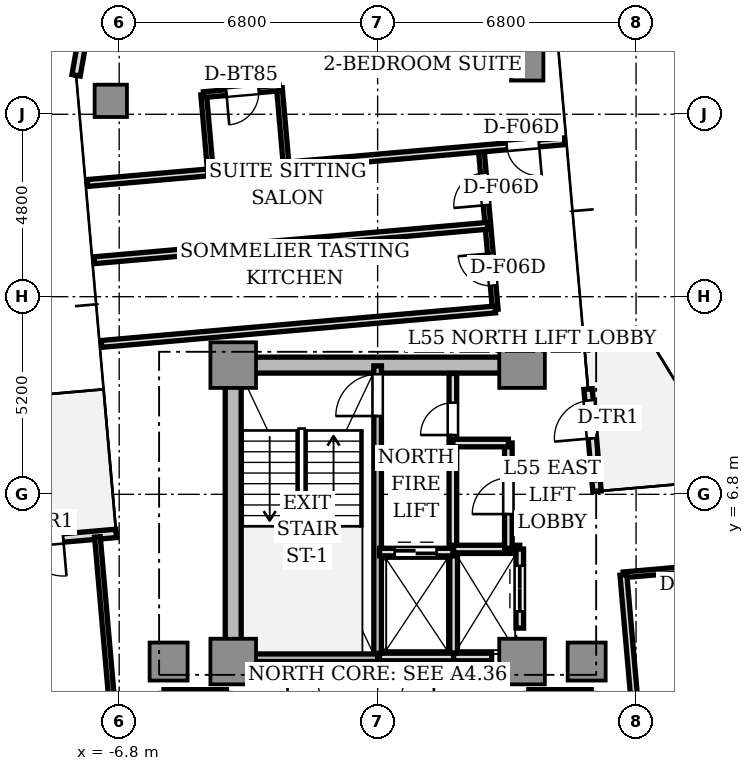
"""IFC4 building model, lengths in metres.
Left out: names, types, materials, properties, quantities, classifications, styles, units other than length and angle.
Written with IfcOpenShell. Run it as: python <this file> out.ifc"""

import sys

from ifc_helpers import new_model, si_unit, direction, frame, frame_2d, origin, origin_2d, place, context, subcontext, project, spatial, rectangle, extrude, source, transform, mapped, element, fill, save


model = new_model("IFC4")
c1 = context("Model", 3, precision=1e-05, world=origin(), true_north=direction((0.0, 1.0)))
c2 = subcontext(c1, "Body", "Model", "MODEL_VIEW")
j1 = project(units=[si_unit("LENGTHUNIT", "METRE"), si_unit("PLANEANGLEUNIT", "RADIAN")], contexts=[c1])
p1 = place(None, origin())
s1 = spatial("IfcSite", under=j1, at=p1, CompositionType="ELEMENT")
p2 = place(p1, origin())
s2 = spatial("IfcBuilding", under=s1, at=p2, CompositionType="ELEMENT")
p3 = place(p2, frame((0.0, 0.0, 198.65)))
s3 = spatial("IfcBuildingStorey", under=s2, at=p3, CompositionType="ELEMENT", Elevation=198.65)
p4 = place(p3, frame((-3.55, 10.2, 0.0), z_axis=(0.0, 0.0, 1.0), x_axis=(1.0, 0.0, 0.0)))
e1 = element("IfcWall", 1, at=p4, inside=s3, PredefinedType="SHEAR", context=c2, shape_type="SweptSolid", body=[
    extrude(rectangle(XDim=7.1, YDim=0.42, at=frame_2d((3.55, 0.0))), origin(), (0.0, 0.0, 1.0), 3.03),
])
p5 = place(p3, frame((-3.8, 2.85, 0.0), z_axis=(0.0, 0.0, 1.0), x_axis=(0.0, 1.0, 0.0)))
e2 = element("IfcWall", 2, at=p5, inside=s3, PredefinedType="SHEAR", context=c2, shape_type="SweptSolid", body=[
    extrude(rectangle(XDim=6.9, YDim=0.42, at=frame_2d((3.45, 0.0))), origin(), (0.0, 0.0, 1.0), 3.03),
])
m1 = source(origin(), c2, "Body", "SweptSolid", [
    extrude(rectangle(XDim=1.2, YDim=1.2, at=origin_2d()), origin(), (0.0, 0.0, 1.0), 3.03),
])
for number, where, z_axis, x_axis in (
    (3, (-3.8, 2.4, 0.0), (0.0, 0.0, 1.0), (1.0, 0.0, 0.0)),
    (4, (3.8, 2.4, 0.0), (0.0, 0.0, 1.0), (1.0, 0.0, 0.0)),
    (5, (-3.8, 10.2, 0.0), (0.0, 0.0, 1.0), (1.0, 0.0, 0.0)),
    (6, (3.8, 10.2, 0.0), (0.0, 0.0, 1.0), (1.0, 0.0, 0.0)),
):
    element("IfcColumn", number, at=place(p3, frame(where, z_axis=z_axis, x_axis=x_axis)), inside=s3, PredefinedType="COLUMN", context=c2, shape_type="MappedRepresentation", body=[
        mapped(m1, transform((0.0, 0.0, 0.0), scale=1.0)),
    ])
m2 = source(origin(), c2, "Body", "SweptSolid", [
    extrude(rectangle(XDim=1.0, YDim=1.0, at=origin_2d()), origin(), (0.0, 0.0, 1.0), 3.03),
])
for number, where, z_axis, x_axis in (
    (7, (5.5, 2.4, 0.0), (0.0, 0.0, 1.0), (1.0, 0.0, 0.0)),
    (8, (-5.5, 2.4, 0.0), (0.0, 0.0, 1.0), (1.0, 0.0, 0.0)),
):
    element("IfcColumn", number, at=place(p3, frame(where, z_axis=z_axis, x_axis=x_axis)), inside=s3, PredefinedType="COLUMN", context=c2, shape_type="MappedRepresentation", body=[
        mapped(m2, transform((0.0, 0.0, 0.0), scale=1.0)),
    ])
m3 = source(origin(), c2, "Body", "SweptSolid", [
    extrude(rectangle(XDim=0.85, YDim=0.85, at=origin_2d()), origin(), (0.0, 0.0, 1.0), 3.03),
])
for number, where, z_axis, x_axis in (
    (9, (3.936, 18.112, 0.0), (0.0, 0.0, 1.0), (1.0, 0.0, 0.0)),
    (10, (-7.022, 17.153, 0.0), (0.0, 0.0, 1.0), (1.0, 0.0, 0.0)),
):
    element("IfcColumn", number, at=place(p3, frame(where, z_axis=z_axis, x_axis=x_axis)), inside=s3, PredefinedType="COLUMN", context=c2, shape_type="MappedRepresentation", body=[
        mapped(m3, transform((0.0, 0.0, 0.0), scale=1.0)),
    ])
p6 = place(p3, frame((5.772, 6.879, 0.0), z_axis=(0.0, 0.0, 1.0), x_axis=(-0.087168071984, 0.996193619346, 0.0)))
e11 = element("IfcWall", 11, at=p6, inside=s3, PredefinedType="STANDARD", context=c2, shape_type="SweptSolid", body=[
    extrude(rectangle(XDim=2.7, YDim=0.22, at=frame_2d((1.35, 0.0))), origin(), (0.0, 0.0, 1.0), 3.03),
])
p7 = place(p6, frame((1.4, 0.0, 0.0)))
e12 = element("IfcOpeningElement", 12, at=p7, cuts=e11, PredefinedType="OPENING", context=c2, shape_type="SweptSolid", body=[
    extrude(rectangle(XDim=1.0, YDim=2.2, at=frame_2d((0.5, 1.1))), frame((0.0, 0.12, 0.0), z_axis=(0.0, -1.0, 0.0), x_axis=(1.0, 0.0, 0.0)), (0.0, 0.0, 1.0), 0.24),
])
p8 = place(p3, frame((-7.768, 18.769, 0.0), z_axis=(0.0, 0.0, 1.0), x_axis=(-0.173654409999, -0.984806654064, 0.0)))
e13 = element("IfcWall", 13, at=p8, inside=s3, PredefinedType="STANDARD", context=c2, shape_type="SweptSolid", body=[
    extrude(rectangle(XDim=0.958, YDim=0.22, at=frame_2d((0.479, 0.0))), origin(), (0.0, 0.0, 1.0), 3.03),
])
p9 = place(p3, frame((-6.879, 5.772, 0.0), z_axis=(0.0, 0.0, 1.0), x_axis=(-0.996193619346, -0.087168071984, 0.0)))
e14 = element("IfcWall", 14, at=p9, inside=s3, PredefinedType="STANDARD", context=c2, shape_type="SweptSolid", body=[
    extrude(rectangle(XDim=2.7, YDim=0.22, at=frame_2d((1.35, 0.0))), origin(), (0.0, 0.0, 1.0), 3.03),
])
p10 = place(p9, frame((1.4, 0.0, 0.0)))
e15 = element("IfcOpeningElement", 15, at=p10, cuts=e14, PredefinedType="OPENING", context=c2, shape_type="SweptSolid", body=[
    extrude(rectangle(XDim=1.0, YDim=2.2, at=frame_2d((0.5, 1.1))), frame((0.0, 0.12, 0.0), z_axis=(0.0, -1.0, 0.0), x_axis=(1.0, 0.0, 0.0)), (0.0, 0.0, 1.0), 0.24),
])
p11 = place(p3, frame((0.0, 2.5, 0.0), z_axis=(0.0, 0.0, 1.0), x_axis=(0.0, 1.0, 0.0)))
e16 = element("IfcWall", 16, at=p11, inside=s3, PredefinedType="SOLIDWALL", context=c2, shape_type="SweptSolid", body=[
    extrude(rectangle(XDim=7.68, YDim=0.2, at=frame_2d((3.84, 0.0))), origin(), (0.0, 0.0, 1.0), 3.03),
])
p12 = place(p11, frame((6.36, 0.0, 0.0)))
e17 = element("IfcOpeningElement", 17, at=p12, cuts=e16, PredefinedType="OPENING", context=c2, shape_type="SweptSolid", body=[
    extrude(rectangle(XDim=1.1, YDim=2.15, at=frame_2d((0.55, 1.075))), frame((0.0, 0.11, 0.0), z_axis=(0.0, -1.0, 0.0), x_axis=(1.0, 0.0, 0.0)), (0.0, 0.0, 1.0), 0.22),
])
p13 = place(p3, frame((-3.72, 2.5, 0.0), z_axis=(0.0, 0.0, 1.0), x_axis=(1.0, 0.0, 0.0)))
e18 = element("IfcWall", 18, at=p13, inside=s3, PredefinedType="SOLIDWALL", context=c2, shape_type="SweptSolid", body=[
    extrude(rectangle(XDim=3.72, YDim=0.2, at=frame_2d((1.86, 0.0))), origin(), (0.0, 0.0, 1.0), 3.03),
])
p14 = place(p3, frame((1.98, 5.32, 0.0), z_axis=(0.0, 0.0, 1.0), x_axis=(0.0, 1.0, 0.0)))
e19 = element("IfcWall", 19, at=p14, inside=s3, PredefinedType="SOLIDWALL", context=c2, shape_type="SweptSolid", body=[
    extrude(rectangle(XDim=4.66, YDim=0.2, at=frame_2d((2.33, 0.0))), origin(), (0.0, 0.0, 1.0), 2.58),
])
p15 = place(p14, frame((3.04, 0.0, 0.0)))
e20 = element("IfcOpeningElement", 20, at=p15, cuts=e19, PredefinedType="OPENING", context=c2, shape_type="SweptSolid", body=[
    extrude(rectangle(XDim=0.85, YDim=2.1, at=frame_2d((0.425, 1.05))), frame((0.0, 0.11, 0.0), z_axis=(0.0, -1.0, 0.0), x_axis=(1.0, 0.0, 0.0)), (0.0, 0.0, 1.0), 0.22),
])
p16 = place(p3, frame((2.0, 2.5, 0.0), z_axis=(0.0, 0.0, 1.0), x_axis=(0.0, 1.0, 0.0)))
e21 = element("IfcWall", 21, at=p16, inside=s3, PredefinedType="SOLIDWALL", context=c2, shape_type="SweptSolid", body=[
    extrude(rectangle(XDim=2.78, YDim=0.2, at=frame_2d((1.39, 0.0))), origin(), (0.0, 0.0, 1.0), 2.58),
])
p17 = place(p3, frame((0.05, 2.52, 0.0), z_axis=(0.0, 0.0, 1.0), x_axis=(1.0, 0.0, 0.0)))
e22 = element("IfcWall", 22, at=p17, inside=s3, PredefinedType="SOLIDWALL", context=c2, shape_type="SweptSolid", body=[
    extrude(rectangle(XDim=1.95, YDim=0.2, at=frame_2d((0.975, 0.0))), origin(), (0.0, 0.0, 1.0), 2.58),
])
p18 = place(p3, frame((0.05, 5.28, 0.0), z_axis=(0.0, 0.0, 1.0), x_axis=(1.0, 0.0, 0.0)))
e23 = element("IfcWall", 23, at=p18, inside=s3, PredefinedType="SOLIDWALL", context=c2, shape_type="SweptSolid", body=[
    extrude(rectangle(XDim=1.93, YDim=0.2, at=frame_2d((0.965, 0.0))), origin(), (0.0, 0.0, 1.0), 2.58),
])
p19 = place(p18, frame((0.4, 0.0, 0.0)))
e24 = element("IfcOpeningElement", 24, at=p19, cuts=e23, PredefinedType="OPENING", context=c2, shape_type="SweptSolid", body=[
    extrude(rectangle(XDim=1.1, YDim=2.2, at=frame_2d((0.55, 1.1))), frame((0.0, 0.11, 0.0), z_axis=(0.0, -1.0, 0.0), x_axis=(1.0, 0.0, 0.0)), (0.0, 0.0, 1.0), 0.22),
])
p20 = place(p3, frame((2.0, 2.52, 0.0), z_axis=(0.0, 0.0, 1.0), x_axis=(1.0, 0.0, 0.0)))
e25 = element("IfcWall", 25, at=p20, inside=s3, PredefinedType="SOLIDWALL", context=c2, shape_type="SweptSolid", body=[
    extrude(rectangle(XDim=1.0, YDim=0.2, at=frame_2d((0.5, 0.0))), origin(), (0.0, 0.0, 1.0), 2.58),
])
p21 = place(p3, frame((2.0, 5.36, 0.0), z_axis=(0.0, 0.0, 1.0), x_axis=(1.0, 0.0, 0.0)))
e26 = element("IfcWall", 26, at=p21, inside=s3, PredefinedType="SOLIDWALL", context=c2, shape_type="SweptSolid", body=[
    extrude(rectangle(XDim=1.74, YDim=0.2, at=frame_2d((0.87, 0.0))), origin(), (0.0, 0.0, 1.0), 2.58),
])
p22 = place(p3, frame((3.74, 3.28, 0.0), z_axis=(0.0, 0.0, 1.0), x_axis=(0.0, 1.0, 0.0)))
e27 = element("IfcWall", 27, at=p22, inside=s3, PredefinedType="SOLIDWALL", context=c2, shape_type="SweptSolid", body=[
    extrude(rectangle(XDim=2.08, YDim=0.2, at=frame_2d((1.04, 0.0))), origin(), (0.0, 0.0, 1.0), 2.58),
])
p23 = place(p22, frame((0.44, 0.0, 0.0)))
e28 = element("IfcOpeningElement", 28, at=p23, cuts=e27, PredefinedType="OPENING", context=c2, shape_type="SweptSolid", body=[
    extrude(rectangle(XDim=1.2, YDim=2.2, at=frame_2d((0.6, 1.1))), frame((0.0, 0.11, 0.0), z_axis=(0.0, -1.0, 0.0), x_axis=(1.0, 0.0, 0.0)), (0.0, 0.0, 1.0), 0.22),
])
for number, where, z_axis, x_axis in (
    (29, (3.98, 1.56, 0.0), (0.0, 0.0, 1.0), (1.0, 0.0, 0.0)),
    (30, (-5.62, 1.56, 0.0), (0.0, 0.0, 1.0), (1.0, 0.0, 0.0)),
):
    element("IfcWall", number, at=place(p3, frame(where, z_axis=z_axis, x_axis=x_axis)), inside=s3, PredefinedType="SOLIDWALL", context=c2, shape_type="SweptSolid", body=[
        extrude(rectangle(XDim=1.64, YDim=0.2, at=frame_2d((0.82, 0.0))), origin(), (0.0, 0.0, 1.0), 2.58),
    ])
p24 = place(p3, frame((3.44, 5.38, 0.0), z_axis=(0.0, 0.0, 1.0), x_axis=(0.0, 1.0, 0.0)))
e31 = element("IfcWall", 31, at=p24, inside=s3, PredefinedType="SOLIDWALL", context=c2, shape_type="SweptSolid", body=[
    extrude(rectangle(XDim=2.77, YDim=0.2, at=frame_2d((1.385, 0.0))), origin(), (0.0, 0.0, 1.0), 2.58),
])
p25 = place(p24, frame((0.9, 0.0, 0.0)))
e32 = element("IfcOpeningElement", 32, at=p25, cuts=e31, PredefinedType="OPENING", context=c2, shape_type="SweptSolid", body=[
    extrude(rectangle(XDim=0.95, YDim=2.15, at=frame_2d((0.475, 1.075))), frame((0.0, 0.11, 0.0), z_axis=(0.0, -1.0, 0.0), x_axis=(1.0, 0.0, 0.0)), (0.0, 0.0, 1.0), 0.22),
])
p26 = place(p3, frame((1.98, 8.15, 0.0), z_axis=(0.0, 0.0, 1.0), x_axis=(1.0, 0.0, 0.0)))
e33 = element("IfcWall", 33, at=p26, inside=s3, PredefinedType="SOLIDWALL", context=c2, shape_type="SweptSolid", body=[
    extrude(rectangle(XDim=1.46, YDim=0.2, at=frame_2d((0.73, 0.0))), origin(), (0.0, 0.0, 1.0), 2.58),
])
p27 = place(p3, frame((6.467, 4.681, 0.0), z_axis=(0.0, 0.0, 1.0), x_axis=(0.996195452949, 0.087147114263, 0.0)))
e34 = element("IfcWall", 34, at=p27, inside=s3, PredefinedType="PARTITIONING", context=c2, shape_type="SweptSolid", body=[
    extrude(rectangle(XDim=8.55, YDim=0.15, at=frame_2d((4.275, 0.0))), origin(), (0.0, 0.0, 1.0), 2.58),
])
p28 = place(p27, frame((1.491, 0.0, 0.0)))
e35 = element("IfcOpeningElement", 35, at=p28, cuts=e34, PredefinedType="OPENING", context=c2, shape_type="SweptSolid", body=[
    extrude(rectangle(XDim=0.85, YDim=2.1, at=frame_2d((0.425, 1.05))), frame((0.0, 0.085, 0.0), z_axis=(0.0, -1.0, 0.0), x_axis=(1.0, 0.0, 0.0)), (0.0, 0.0, 1.0), 0.17),
])
p29 = place(p27, frame((4.792, 0.0, 0.0)))
e36 = element("IfcOpeningElement", 36, at=p29, cuts=e34, PredefinedType="OPENING", context=c2, shape_type="SweptSolid", body=[
    extrude(rectangle(XDim=0.85, YDim=2.1, at=frame_2d((0.425, 1.05))), frame((0.0, 0.085, 0.0), z_axis=(0.0, -1.0, 0.0), x_axis=(1.0, 0.0, 0.0)), (0.0, 0.0, 1.0), 0.17),
])
p30 = place(p3, frame((7.373, -5.679, 0.0), z_axis=(0.0, 0.0, 1.0), x_axis=(-0.087163455754, 0.996194023261, 0.0)))
e37 = element("IfcWall", 37, at=p30, inside=s3, PredefinedType="PARTITIONING", context=c2, shape_type="SweptSolid", body=[
    extrude(rectangle(XDim=10.4, YDim=0.18, at=frame_2d((5.2, 0.0))), origin(), (0.0, 0.0, 1.0), 2.58),
])
p31 = place(p3, frame((3.095, 11.664, 0.0), z_axis=(0.0, 0.0, 1.0), x_axis=(-0.087142722004, 0.996195837173, 0.0)))
e38 = element("IfcWall", 38, at=p31, inside=s3, PredefinedType="PARTITIONING", context=c2, shape_type="SweptSolid", body=[
    extrude(rectangle(XDim=4.25, YDim=0.15, at=frame_2d((2.125, 0.0))), origin(), (0.0, 0.0, 1.0), 2.58),
])
p32 = place(p31, frame((0.63, 0.0, 0.0)))
e39 = element("IfcOpeningElement", 39, at=p32, cuts=e38, PredefinedType="OPENING", context=c2, shape_type="SweptSolid", body=[
    extrude(rectangle(XDim=0.85, YDim=2.1, at=frame_2d((0.425, 1.05))), frame((0.0, 0.085, 0.0), z_axis=(0.0, -1.0, 0.0), x_axis=(1.0, 0.0, 0.0)), (0.0, 0.0, 1.0), 0.17),
])
p33 = place(p31, frame((2.755, 0.0, 0.0)))
e40 = element("IfcOpeningElement", 40, at=p33, cuts=e38, PredefinedType="OPENING", context=c2, shape_type="SweptSolid", body=[
    extrude(rectangle(XDim=0.85, YDim=2.1, at=frame_2d((0.425, 1.05))), frame((0.0, 0.085, 0.0), z_axis=(0.0, -1.0, 0.0), x_axis=(1.0, 0.0, 0.0)), (0.0, 0.0, 1.0), 0.17),
])
p34 = place(p3, frame((3.095, 11.664, 0.0), z_axis=(0.0, 0.0, 1.0), x_axis=(-0.996196061386, -0.087140158824, 0.0)))
e41 = element("IfcWall", 41, at=p34, inside=s3, PredefinedType="PARTITIONING", context=c2, shape_type="SweptSolid", body=[
    extrude(rectangle(XDim=10.4, YDim=0.18, at=frame_2d((5.2, 0.0))), origin(), (0.0, 0.0, 1.0), 2.58),
])
p35 = place(p3, frame((2.903, 13.866, 0.0), z_axis=(0.0, 0.0, 1.0), x_axis=(-0.996194201607, -0.087161417409, 0.0)))
e42 = element("IfcWall", 42, at=p35, inside=s3, PredefinedType="PARTITIONING", context=c2, shape_type="SweptSolid", body=[
    extrude(rectangle(XDim=10.4, YDim=0.18, at=frame_2d((5.2, 0.0))), origin(), (0.0, 0.0, 1.0), 2.58),
])
p36 = place(p3, frame((4.917, 16.09, 0.0), z_axis=(0.0, 0.0, 1.0), x_axis=(-0.996196619285, -0.087133780622, 0.0)))
e43 = element("IfcWall", 43, at=p36, inside=s3, PredefinedType="PARTITIONING", context=c2, shape_type="SweptSolid", body=[
    extrude(rectangle(XDim=12.6, YDim=0.18, at=frame_2d((6.3, 0.0))), origin(), (0.0, 0.0, 1.0), 2.58),
])
p37 = place(p36, frame((0.675, 0.0, 0.0)))
e44 = element("IfcOpeningElement", 44, at=p37, cuts=e43, PredefinedType="OPENING", context=c2, shape_type="SweptSolid", body=[
    extrude(rectangle(XDim=0.85, YDim=2.1, at=frame_2d((0.425, 1.05))), frame((0.0, 0.1, 0.0), z_axis=(0.0, -1.0, 0.0), x_axis=(1.0, 0.0, 0.0)), (0.0, 0.0, 1.0), 0.2),
])
for number, where, z_axis, x_axis in (
    (45, (-4.398, 15.275, 0.0), (0.0, 0.0, 1.0), (-0.087, 0.996, 0.0)),
    (46, (-2.406, 15.449, 0.0), (0.0, 0.0, 1.0), (-0.087, 0.996, 0.0)),
):
    element("IfcWall", number, at=place(p3, frame(where, z_axis=z_axis, x_axis=x_axis)), inside=s3, PredefinedType="PARTITIONING", context=c2, shape_type="SweptSolid", body=[
        extrude(rectangle(XDim=2.05, YDim=0.15, at=frame_2d((1.025, 0.0))), origin(), (0.0, 0.0, 1.0), 2.58),
    ])
p38 = place(p3, frame((-2.584, 17.491, 0.0), z_axis=(0.0, 0.0, 1.0), x_axis=(-0.99619464492, -0.087156350505, 0.0)))
e47 = element("IfcWall", 47, at=p38, inside=s3, PredefinedType="PARTITIONING", context=c2, shape_type="SweptSolid", body=[
    extrude(rectangle(XDim=2.0, YDim=0.15, at=frame_2d((1.0, 0.0))), origin(), (0.0, 0.0, 1.0), 2.55),
])
p39 = place(p38, frame((0.55, 0.0, 0.0)))
e48 = element("IfcOpeningElement", 48, at=p39, cuts=e47, PredefinedType="OPENING", context=c2, shape_type="SweptSolid", body=[
    extrude(rectangle(XDim=0.85, YDim=2.1, at=frame_2d((0.425, 1.05))), frame((0.0, 0.085, 0.0), z_axis=(0.0, -1.0, 0.0), x_axis=(1.0, 0.0, 0.0)), (0.0, 0.0, 1.0), 0.17),
])
p40 = place(p3, frame((-7.373, 5.679, 0.0), z_axis=(0.0, 0.0, 1.0), x_axis=(0.087154691724, -0.996194790044, 0.0)))
e49 = element("IfcWall", 49, at=p40, inside=s3, PredefinedType="PARTITIONING", context=c2, shape_type="SweptSolid", body=[
    extrude(rectangle(XDim=12.6, YDim=0.15, at=frame_2d((6.3, 0.0))), origin(), (0.0, 0.0, 1.0), 2.58),
])
p41 = place(p40, frame((5.5, 0.0, 0.0)))
e50 = element("IfcOpeningElement", 50, at=p41, cuts=e49, PredefinedType="OPENING", context=c2, shape_type="SweptSolid", body=[
    extrude(rectangle(XDim=1.6, YDim=2.25, at=frame_2d((0.8, 1.125))), frame((0.0, 0.085, 0.0), z_axis=(0.0, -1.0, 0.0), x_axis=(1.0, 0.0, 0.0)), (0.0, 0.0, 1.0), 0.17),
])
m4 = source(origin(), c2, "Body", "SweptSolid", [
    extrude(rectangle(XDim=1.0, YDim=0.05, at=origin_2d()), origin(), (0.0, 0.0, 1.0), 2.2),
])
p42 = place(p7, frame((0.5, 0.0, 0.0)))
e51 = element("IfcDoor", 51, at=p42, inside=s3, OperationType="SINGLE_SWING_LEFT", PredefinedType="DOOR", context=c2, shape_type="MappedRepresentation", body=[
    mapped(m4, transform((0.0, 0.0, 0.0), scale=1.0)),
])
fill(e12, e51)
p43 = place(p10, frame((0.5, 0.0, 0.0)))
e52 = element("IfcDoor", 52, at=p43, inside=s3, OperationType="SINGLE_SWING_LEFT", PredefinedType="DOOR", context=c2, shape_type="MappedRepresentation", body=[
    mapped(m4, transform((0.0, 0.0, 0.0), scale=1.0)),
])
fill(e15, e52)
m5 = source(origin(), c2, "Body", "SweptSolid", [
    extrude(rectangle(XDim=1.1, YDim=0.05, at=origin_2d()), origin(), (0.0, 0.0, 1.0), 2.15),
])
p44 = place(p12, frame((0.55, 0.0, 0.0)))
e53 = element("IfcDoor", 53, at=p44, inside=s3, OperationType="SINGLE_SWING_LEFT", PredefinedType="DOOR", context=c2, shape_type="MappedRepresentation", body=[
    mapped(m5, transform((0.0, 0.0, 0.0), scale=1.0)),
])
fill(e17, e53)
m6 = source(origin(), c2, "Body", "SweptSolid", [
    extrude(rectangle(XDim=0.85, YDim=0.05, at=origin_2d()), origin(), (0.0, 0.0, 1.0), 2.1),
])
p45 = place(p15, frame((0.425, 0.0, 0.0)))
e54 = element("IfcDoor", 54, at=p45, inside=s3, OperationType="SINGLE_SWING_LEFT", PredefinedType="DOOR", context=c2, shape_type="MappedRepresentation", body=[
    mapped(m6, transform((0.0, 0.0, 0.0), scale=1.0)),
])
fill(e20, e54)
m7 = source(origin(), c2, "Body", "SweptSolid", [
    extrude(rectangle(XDim=1.1, YDim=0.05, at=origin_2d()), origin(), (0.0, 0.0, 1.0), 2.2),
])
p46 = place(p19, frame((0.55, 0.0, 0.0)))
e55 = element("IfcDoor", 55, at=p46, inside=s3, OperationType="DOUBLE_DOOR_SLIDING", PredefinedType="DOOR", context=c2, shape_type="MappedRepresentation", body=[
    mapped(m7, transform((0.0, 0.0, 0.0), scale=1.0)),
])
fill(e24, e55)
m8 = source(origin(), c2, "Body", "SweptSolid", [
    extrude(rectangle(XDim=1.2, YDim=0.05, at=origin_2d()), origin(), (0.0, 0.0, 1.0), 2.2),
])
p47 = place(p23, frame((0.6, 0.0, 0.0)))
e56 = element("IfcDoor", 56, at=p47, inside=s3, OperationType="DOUBLE_DOOR_SLIDING", PredefinedType="DOOR", context=c2, shape_type="MappedRepresentation", body=[
    mapped(m8, transform((0.0, 0.0, 0.0), scale=1.0)),
])
fill(e28, e56)
m9 = source(origin(), c2, "Body", "SweptSolid", [
    extrude(rectangle(XDim=0.95, YDim=0.05, at=origin_2d()), origin(), (0.0, 0.0, 1.0), 2.15),
])
p48 = place(p25, frame((0.475, 0.0, 0.0)))
e57 = element("IfcDoor", 57, at=p48, inside=s3, OperationType="SINGLE_SWING_LEFT", PredefinedType="DOOR", context=c2, shape_type="MappedRepresentation", body=[
    mapped(m9, transform((0.0, 0.0, 0.0), scale=1.0)),
])
fill(e32, e57)
p49 = place(p32, frame((0.425, 0.0, 0.0)))
e58 = element("IfcDoor", 58, at=p49, inside=s3, OperationType="SINGLE_SWING_RIGHT", PredefinedType="DOOR", context=c2, shape_type="MappedRepresentation", body=[
    mapped(m6, transform((0.0, 0.0, 0.0), scale=1.0)),
])
fill(e39, e58)
p50 = place(p33, frame((0.425, 0.0, 0.0)))
e59 = element("IfcDoor", 59, at=p50, inside=s3, OperationType="SINGLE_SWING_LEFT", PredefinedType="DOOR", context=c2, shape_type="MappedRepresentation", body=[
    mapped(m6, transform((0.0, 0.0, 0.0), scale=1.0)),
])
fill(e40, e59)
p51 = place(p39, frame((0.425, 0.0, 0.0)))
e60 = element("IfcDoor", 60, at=p51, inside=s3, OperationType="SINGLE_SWING_RIGHT", PredefinedType="DOOR", context=c2, shape_type="MappedRepresentation", body=[
    mapped(m6, transform((0.0, 0.0, 0.0), scale=1.0)),
])
fill(e48, e60)
p52 = place(p37, frame((0.425, 0.0, 0.0)))
e61 = element("IfcDoor", 61, at=p52, inside=s3, OperationType="SINGLE_SWING_LEFT", PredefinedType="DOOR", context=c2, shape_type="MappedRepresentation", body=[
    mapped(m6, transform((0.0, 0.0, 0.0), scale=1.0)),
])
fill(e44, e61)
save(model, sys.argv[1])
